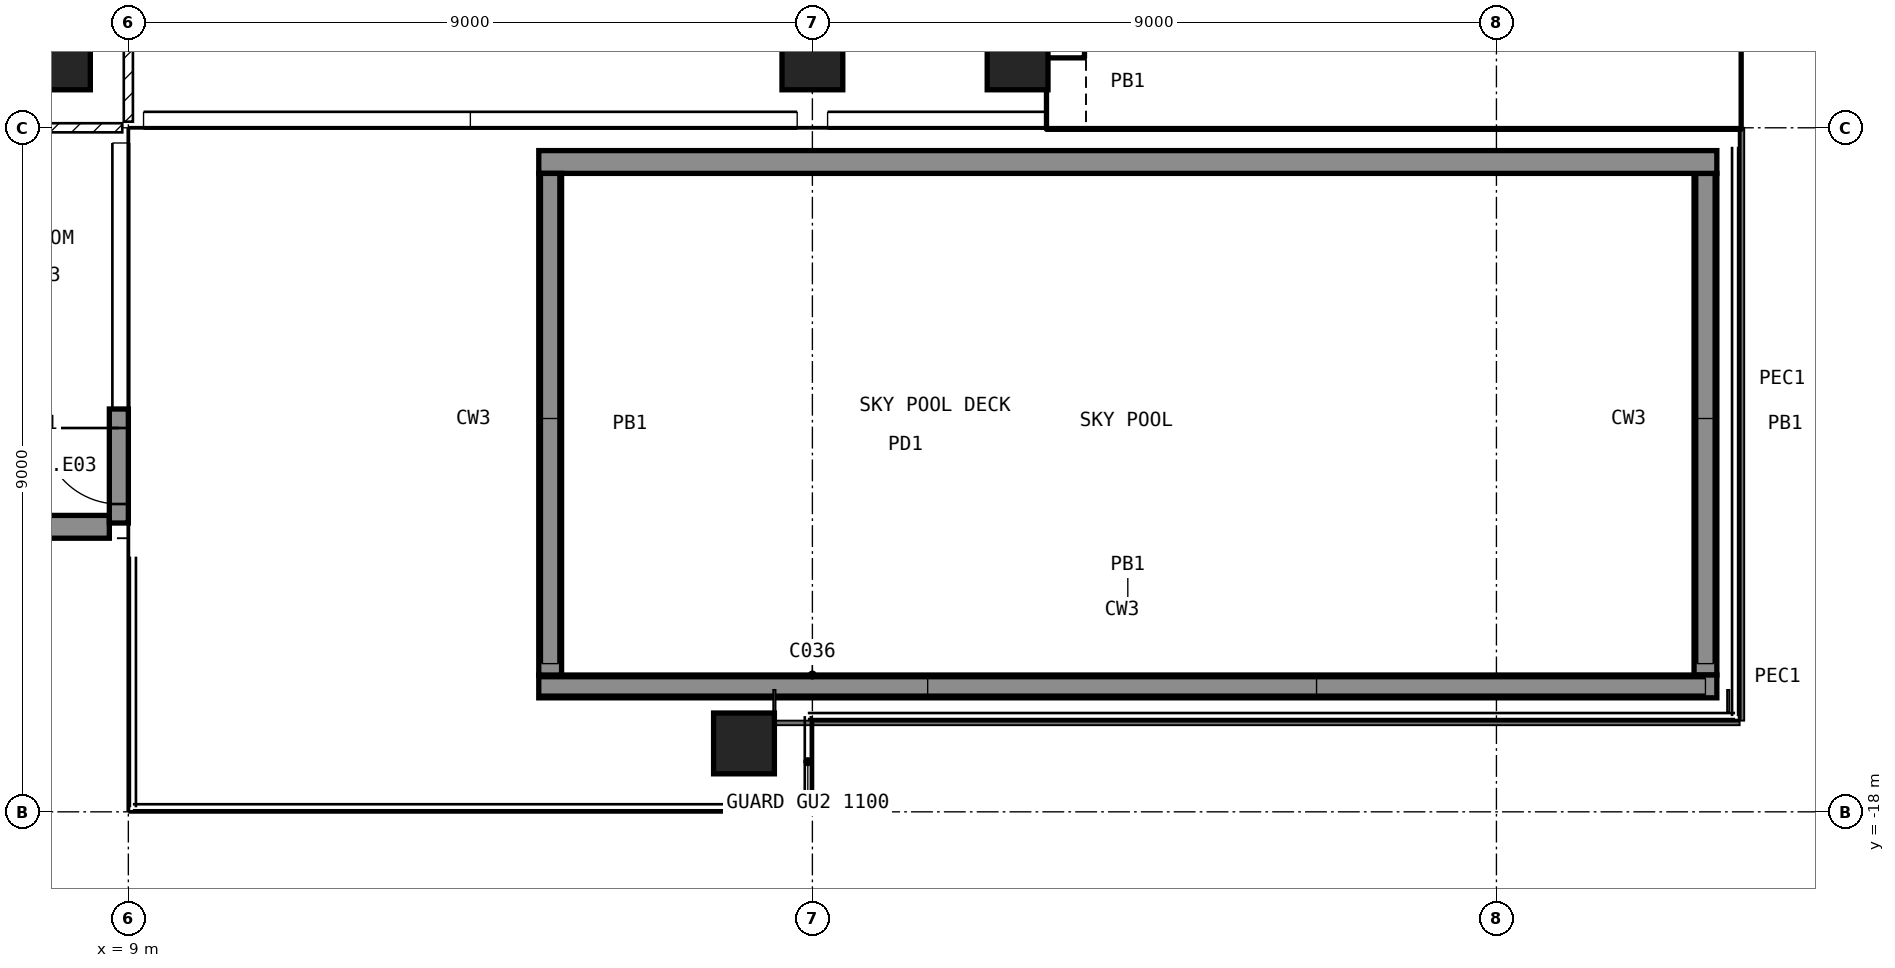
"""IFC4 building model, lengths in metres.
Left out: names, types, materials, properties, quantities, classifications, styles, units other than length and angle.
Written with IfcOpenShell. Run it as: python <this file> out.ifc"""

import sys

from ifc_helpers import new_model, si_unit, direction, frame, frame_2d, origin, origin_2d, place, context, subcontext, project, spatial, rectangle, extrude, element, fill, save


model = new_model("IFC4")
c1 = context("Model", 3, precision=1e-05, world=origin(), true_north=direction((0.0, 1.0)))
c2 = subcontext(c1, "Body", "Model", "MODEL_VIEW")
j1 = project(units=[si_unit("LENGTHUNIT", "METRE"), si_unit("PLANEANGLEUNIT", "RADIAN")], contexts=[c1])
p1 = place(None, origin())
s1 = spatial("IfcSite", under=j1, at=p1, CompositionType="ELEMENT")
p2 = place(p1, origin())
s2 = spatial("IfcBuilding", under=s1, at=p2, CompositionType="ELEMENT")
p3 = place(p2, frame((0.0, 0.0, 285.0)))
s3 = spatial("IfcBuildingStorey", under=s2, at=p3, CompositionType="ELEMENT", Elevation=285.0)
for number, where, z_axis, x_axis in (
    (1, (8.1, -8.1, -0.3), (0.0, 0.0, 1.0), (1.0, 0.0, 0.0)),
    (2, (18.0, -8.1, -0.3), (0.0, 0.0, 1.0), (1.0, 0.0, 0.0)),
    (3, (20.7, -8.1, -0.3), (0.0, 0.0, 1.0), (1.0, 0.0, 0.0)),
    (4, (17.1, -17.1, -0.3), (0.0, 0.0, 1.0), (1.0, 0.0, 0.0)),
):
    element("IfcColumn", number, at=place(p3, frame(where, z_axis=z_axis, x_axis=x_axis)), inside=s3, PredefinedType="COLUMN", context=c2, shape_type="SweptSolid", body=[
        extrude(rectangle(XDim=0.8, YDim=0.8, at=origin_2d()), origin(), (0.0, 0.0, 1.0), 5.45),
    ])
p4 = place(p3, frame((8.875, -14.2, 0.0), z_axis=(0.0, 0.0, 1.0), x_axis=(0.0, 1.0, 0.0)))
e5 = element("IfcWall", 5, at=p4, inside=s3, PredefinedType="SOLIDWALL", context=c2, shape_type="SweptSolid", body=[
    extrude(rectangle(XDim=1.5, YDim=0.25, at=frame_2d((0.75, 0.0))), origin(), (0.0, 0.0, 1.0), 5.15),
])
p5 = place(p4, frame((0.25, 0.0, 0.0)))
e6 = element("IfcOpeningElement", 6, at=p5, cuts=e5, PredefinedType="OPENING", context=c2, shape_type="SweptSolid", body=[
    extrude(rectangle(XDim=1.0, YDim=2.4, at=frame_2d((0.5, 1.2))), frame((0.0, 0.135, 0.0), z_axis=(0.0, -1.0, 0.0), x_axis=(1.0, 0.0, 0.0)), (0.0, 0.0, 1.0), 0.27),
])
p6 = place(p3, frame((6.9, -14.25, 0.0), z_axis=(0.0, 0.0, 1.0), x_axis=(1.0, 0.0, 0.0)))
e7 = element("IfcWall", 7, at=p6, inside=s3, PredefinedType="SOLIDWALL", context=c2, shape_type="SweptSolid", body=[
    extrude(rectangle(XDim=1.85, YDim=0.3, at=frame_2d((0.925, 0.0))), origin(), (0.0, 0.0, 1.0), 5.15),
])
p7 = place(p3, frame((29.75, -9.6, 0.0), z_axis=(0.0, 0.0, 1.0), x_axis=(0.0, -1.0, 0.0)))
e8 = element("IfcWall", 8, at=p7, inside=s3, PredefinedType="SOLIDWALL", context=c2, shape_type="SweptSolid", body=[
    extrude(rectangle(XDim=6.6, YDim=0.3, at=frame_2d((3.3, 0.0))), origin(), (0.0, 0.0, 1.0), 1.55),
])
for number, where, z_axis, x_axis in (
    (9, (14.4, -9.45, 0.0), (0.0, 0.0, 1.0), (1.0, 0.0, 0.0)),
    (10, (14.4, -16.35, 0.0), (0.0, 0.0, 1.0), (1.0, 0.0, 0.0)),
):
    element("IfcWall", number, at=place(p3, frame(where, z_axis=z_axis, x_axis=x_axis)), inside=s3, PredefinedType="SOLIDWALL", context=c2, shape_type="SweptSolid", body=[
        extrude(rectangle(XDim=15.5, YDim=0.3, at=frame_2d((7.75, 0.0))), origin(), (0.0, 0.0, 1.0), 1.55),
    ])
p8 = place(p3, frame((14.55, -9.6, 0.0), z_axis=(0.0, 0.0, 1.0), x_axis=(0.0, -1.0, 0.0)))
e11 = element("IfcWall", 11, at=p8, inside=s3, PredefinedType="SOLIDWALL", context=c2, shape_type="SweptSolid", body=[
    extrude(rectangle(XDim=6.6, YDim=0.3, at=frame_2d((3.3, 0.0))), origin(), (0.0, 0.0, 1.0), 1.55),
])
p9 = place(p3, frame((21.1, -8.55, 0.0), z_axis=(0.0, 0.0, 1.0), x_axis=(1.0, 0.0, 0.0)))
e12 = element("IfcWall", 12, at=p9, inside=s3, PredefinedType="SHEAR", context=c2, shape_type="SweptSolid", body=[
    extrude(rectangle(XDim=9.1, YDim=0.9, at=frame_2d((4.55, 0.0))), origin(), (0.0, 0.0, 1.0), 5.15),
])
p10 = place(p3, frame((29.975, -8.1, 0.0), z_axis=(0.0, 0.0, 1.0), x_axis=(0.0, 1.0, 0.0)))
e13 = element("IfcWall", 13, at=p10, inside=s3, PredefinedType="SHEAR", context=c2, shape_type="SweptSolid", body=[
    extrude(rectangle(XDim=1.35, YDim=0.45, at=frame_2d((0.675, 0.0))), origin(), (0.0, 0.0, 1.0), 5.15),
])
p11 = place(p3, frame((21.825, -8.1, 0.0), z_axis=(0.0, 0.0, 1.0), x_axis=(0.0, 1.0, 0.0)))
e14 = element("IfcWall", 14, at=p11, inside=s3, PredefinedType="SHEAR", context=c2, shape_type="SweptSolid", body=[
    extrude(rectangle(XDim=6.9, YDim=0.45, at=frame_2d((3.45, 0.0))), origin(), (0.0, 0.0, 1.0), 5.15),
])
p12 = place(p3, frame((28.25, -8.1, 0.0), z_axis=(0.0, 0.0, 1.0), x_axis=(0.0, 1.0, 0.0)))
e15 = element("IfcWall", 15, at=p12, inside=s3, PredefinedType="SOLIDWALL", context=c2, shape_type="SweptSolid", body=[
    extrude(rectangle(XDim=2.85, YDim=0.2, at=frame_2d((1.425, 0.0))), origin(), (0.0, 0.0, 1.0), 5.15),
])
p13 = place(p3, frame((9.0, -1.26, 0.0), z_axis=(0.0, 0.0, 1.0), x_axis=(0.0, -1.0, 0.0)))
e16 = element("IfcWall", 16, at=p13, inside=s3, PredefinedType="PARTITIONING", context=c2, shape_type="SweptSolid", body=[
    extrude(rectangle(XDim=7.66, YDim=0.12, at=frame_2d((3.83, 0.0))), origin(), (0.0, 0.0, 1.0), 5.15),
])
p14 = place(p13, frame((4.44, 0.0, 0.0)))
e17 = element("IfcOpeningElement", 17, at=p14, cuts=e16, PredefinedType="OPENING", context=c2, shape_type="SweptSolid", body=[
    extrude(rectangle(XDim=0.9, YDim=2.1, at=frame_2d((0.45, 1.05))), frame((0.0, 0.07, 0.0), z_axis=(0.0, -1.0, 0.0), x_axis=(1.0, 0.0, 0.0)), (0.0, 0.0, 1.0), 0.14),
])
p15 = place(p3, frame((8.92, -9.0, 0.0), z_axis=(0.0, 0.0, 1.0), x_axis=(-1.0, 0.0, 0.0)))
e18 = element("IfcWall", 18, at=p15, inside=s3, PredefinedType="PARTITIONING", context=c2, shape_type="SweptSolid", body=[
    extrude(rectangle(XDim=11.02, YDim=0.12, at=frame_2d((5.51, 0.0))), origin(), (0.0, 0.0, 1.0), 5.15),
])
p16 = place(p15, frame((8.02, 0.0, 0.0)))
e19 = element("IfcOpeningElement", 19, at=p16, cuts=e18, PredefinedType="OPENING", context=c2, shape_type="SweptSolid", body=[
    extrude(rectangle(XDim=1.8, YDim=2.1, at=frame_2d((0.9, 1.05))), frame((0.0, 0.07, 0.0), z_axis=(0.0, -1.0, 0.0), x_axis=(1.0, 0.0, 0.0)), (0.0, 0.0, 1.0), 0.14),
])
p17 = place(p5, origin())
e20 = element("IfcDoor", 20, at=p17, inside=s3, OperationType="SINGLE_SWING_RIGHT", PredefinedType="DOOR", context=c2, shape_type="SweptSolid", body=[
    extrude(rectangle(XDim=1.0, YDim=2.4, at=frame_2d((0.5, 1.2))), frame((0.0, 0.025, 0.0), z_axis=(0.0, -1.0, 0.0), x_axis=(1.0, 0.0, 0.0)), (0.0, 0.0, 1.0), 0.05),
])
fill(e6, e20)
save(model, sys.argv[1])
